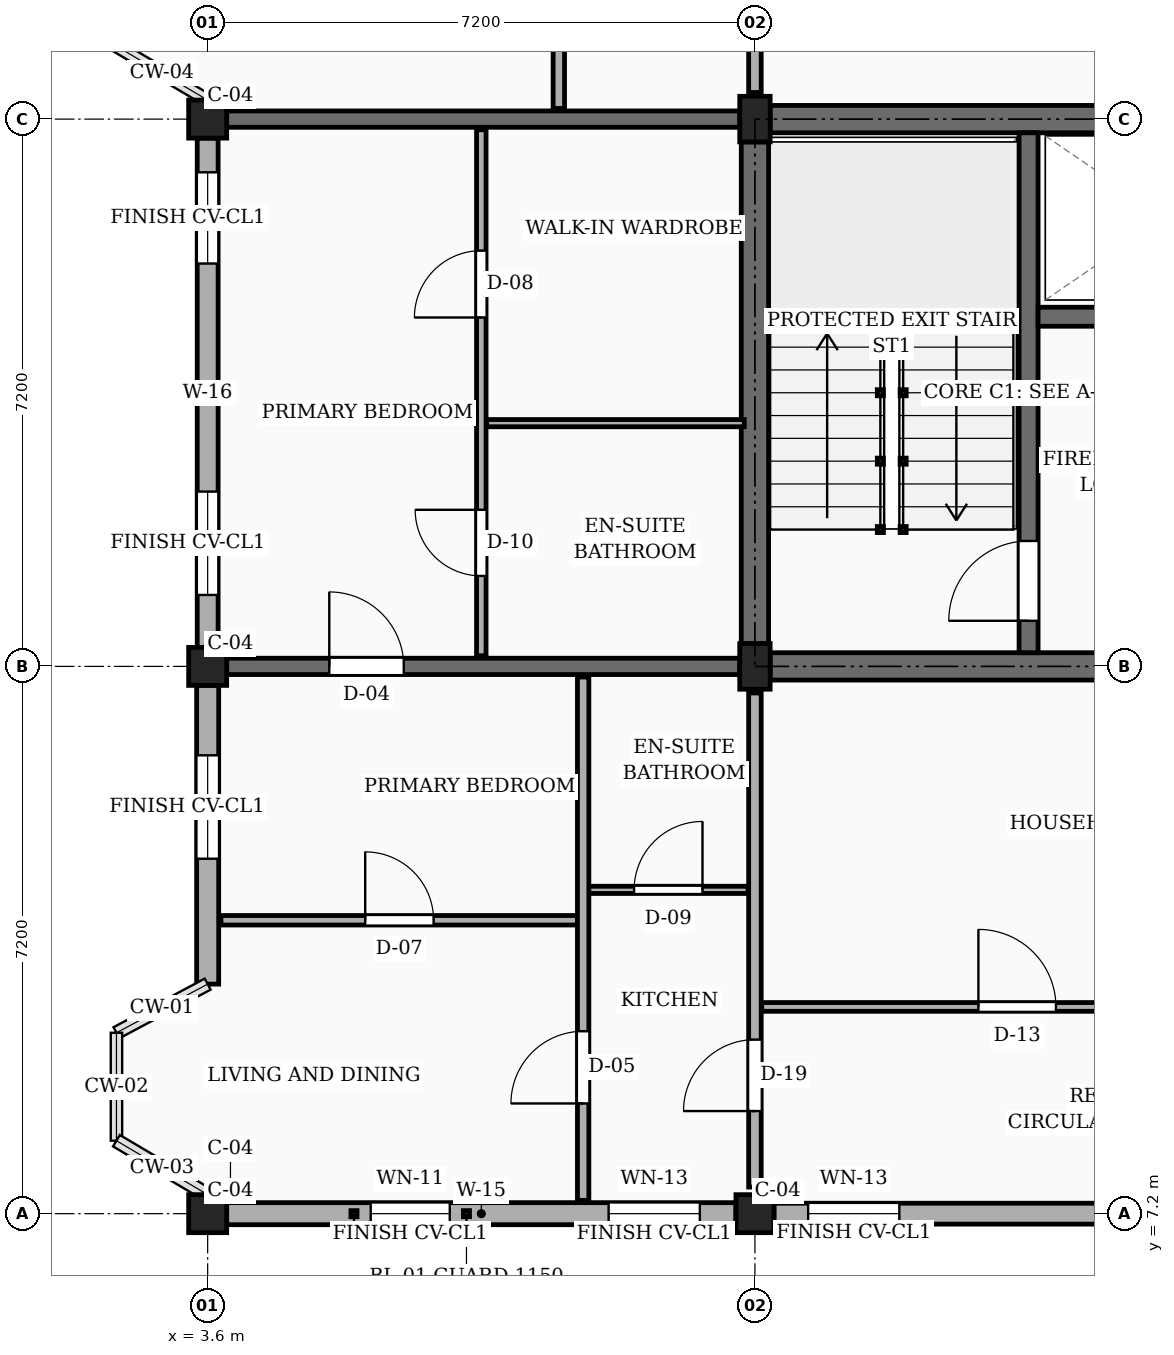
"""IFC4 building model, lengths in metres.
Left out: names, types, materials, properties, quantities, classifications, styles, units other than length and angle.
Written with IfcOpenShell. Run it as: python <this file> out.ifc"""

import sys

from ifc_helpers import new_model, si_unit, direction, frame, frame_2d, origin, origin_2d, place, context, subcontext, project, spatial, rectangle, extrude, element, fill, save


model = new_model("IFC4")
c1 = context("Model", 3, precision=1e-05, world=origin(), true_north=direction((0.0, 1.0)))
c2 = subcontext(c1, "Body", "Model", "MODEL_VIEW")
j1 = project(units=[si_unit("LENGTHUNIT", "METRE"), si_unit("PLANEANGLEUNIT", "RADIAN")], contexts=[c1])
p1 = place(None, origin())
s1 = spatial("IfcSite", under=j1, at=p1, CompositionType="ELEMENT")
p2 = place(p1, origin())
s2 = spatial("IfcBuilding", under=s1, at=p2, CompositionType="ELEMENT")
p3 = place(p2, frame((0.0, 0.0, 32.85)))
s3 = spatial("IfcBuildingStorey", under=s2, at=p3, CompositionType="ELEMENT", Elevation=32.85)
for number, where, z_axis, x_axis in (
    (1, (3.6, 7.2, 0.0), (0.0, 0.0, 1.0), (1.0, 0.0, 0.0)),
    (2, (3.6, 14.4, 0.0), (0.0, 0.0, 1.0), (1.0, 0.0, 0.0)),
    (3, (3.6, 21.6, 0.0), (0.0, 0.0, 1.0), (1.0, 0.0, 0.0)),
    (4, (10.8, 7.2, 0.0), (0.0, 0.0, 1.0), (1.0, 0.0, 0.0)),
):
    element("IfcColumn", number, at=place(p3, frame(where, z_axis=z_axis, x_axis=x_axis)), inside=s3, PredefinedType="COLUMN", context=c2, shape_type="SweptSolid", body=[
        extrude(rectangle(XDim=0.5, YDim=0.5, at=origin_2d()), origin(), (0.0, 0.0, 1.0), 3.15),
    ])
for number, where, z_axis, x_axis in (
    (5, (10.8, 14.4, 0.0), (0.0, 0.0, 1.0), (1.0, 0.0, 0.0)),
    (6, (10.8, 21.6, 0.0), (0.0, 0.0, 1.0), (1.0, 0.0, 0.0)),
):
    element("IfcColumn", number, at=place(p3, frame(where, z_axis=z_axis, x_axis=x_axis)), inside=s3, PredefinedType="COLUMN", context=c2, shape_type="SweptSolid", body=[
        extrude(rectangle(XDim=0.4, YDim=0.6, at=origin_2d()), origin(), (0.0, 0.0, 1.0), 3.15),
    ])
p4 = place(p3, frame((3.85, 14.4, 0.0), z_axis=(0.0, 0.0, 1.0), x_axis=(1.0, 0.0, 0.0)))
e7 = element("IfcWall", 7, at=p4, inside=s3, PredefinedType="SOLIDWALL", context=c2, shape_type="SweptSolid", body=[
    extrude(rectangle(XDim=6.75, YDim=0.215, at=frame_2d((3.375, 0.0))), origin(), (0.0, 0.0, 1.0), 2.17),
])
p5 = place(p4, frame((1.35, 0.0, 0.0)))
e8 = element("IfcOpeningElement", 8, at=p5, cuts=e7, PredefinedType="OPENING", context=c2, shape_type="SweptSolid", body=[
    extrude(rectangle(XDim=0.98, YDim=2.12, at=frame_2d((0.49, 1.06))), frame((0.0, 0.118, 0.0), z_axis=(0.0, -1.0, 0.0), x_axis=(1.0, 0.0, 0.0)), (0.0, 0.0, 1.0), 0.235),
])
p6 = place(p3, frame((3.85, 21.6, 0.0), z_axis=(0.0, 0.0, 1.0), x_axis=(1.0, 0.0, 0.0)))
e9 = element("IfcWall", 9, at=p6, inside=s3, PredefinedType="SOLIDWALL", context=c2, shape_type="SweptSolid", body=[
    extrude(rectangle(XDim=6.75, YDim=0.215, at=frame_2d((3.375, 0.0))), origin(), (0.0, 0.0, 1.0), 2.17),
])
p7 = place(p3, frame((3.85, 7.2, 0.0), z_axis=(0.0, 0.0, 1.0), x_axis=(1.0, 0.0, 0.0)))
e10 = element("IfcWall", 10, at=p7, inside=s3, PredefinedType="SOLIDWALL", context=c2, shape_type="SweptSolid", body=[
    extrude(rectangle(XDim=6.7, YDim=0.29, at=frame_2d((3.35, 0.0))), origin(), (0.0, 0.0, 1.0), 2.44),
])
p8 = place(p7, frame((1.895, 0.0, 0.78)))
e11 = element("IfcOpeningElement", 11, at=p8, cuts=e10, PredefinedType="OPENING", context=c2, shape_type="SweptSolid", body=[
    extrude(rectangle(XDim=1.04, YDim=1.26, at=frame_2d((0.52, 0.63))), frame((0.0, 0.155, 0.0), z_axis=(0.0, -1.0, 0.0), x_axis=(1.0, 0.0, 0.0)), (0.0, 0.0, 1.0), 0.31),
])
p9 = place(p7, frame((5.025, 0.0, 0.78)))
e12 = element("IfcOpeningElement", 12, at=p9, cuts=e10, PredefinedType="OPENING", context=c2, shape_type="SweptSolid", body=[
    extrude(rectangle(XDim=1.2, YDim=1.26, at=frame_2d((0.6, 0.63))), frame((0.0, 0.155, 0.0), z_axis=(0.0, -1.0, 0.0), x_axis=(1.0, 0.0, 0.0)), (0.0, 0.0, 1.0), 0.31),
])
p10 = place(p3, frame((11.05, 7.2, 0.0), z_axis=(0.0, 0.0, 1.0), x_axis=(1.0, 0.0, 0.0)))
e13 = element("IfcWall", 13, at=p10, inside=s3, PredefinedType="SOLIDWALL", context=c2, shape_type="SweptSolid", body=[
    extrude(rectangle(XDim=6.7, YDim=0.275, at=frame_2d((3.35, 0.0))), origin(), (0.0, 0.0, 1.0), 2.44),
])
p11 = place(p10, frame((0.45, 0.0, 0.78)))
e14 = element("IfcOpeningElement", 14, at=p11, cuts=e13, PredefinedType="OPENING", context=c2, shape_type="SweptSolid", body=[
    extrude(rectangle(XDim=1.2, YDim=1.26, at=frame_2d((0.6, 0.63))), frame((0.0, 0.147, 0.0), z_axis=(0.0, -1.0, 0.0), x_axis=(1.0, 0.0, 0.0)), (0.0, 0.0, 1.0), 0.295),
])
p12 = place(p10, frame((4.65, 0.0, 0.78)))
e15 = element("IfcOpeningElement", 15, at=p12, cuts=e13, PredefinedType="OPENING", context=c2, shape_type="SweptSolid", body=[
    extrude(rectangle(XDim=1.36, YDim=1.26, at=frame_2d((0.68, 0.63))), frame((0.0, 0.147, 0.0), z_axis=(0.0, -1.0, 0.0), x_axis=(1.0, 0.0, 0.0)), (0.0, 0.0, 1.0), 0.295),
])
p13 = place(p3, frame((3.6, 21.35, 0.0), z_axis=(0.0, 0.0, 1.0), x_axis=(0.0, -1.0, 0.0)))
e16 = element("IfcWall", 16, at=p13, inside=s3, PredefinedType="SOLIDWALL", context=c2, shape_type="SweptSolid", body=[
    extrude(rectangle(XDim=6.7, YDim=0.275, at=frame_2d((3.35, 0.0))), origin(), (0.0, 0.0, 1.0), 2.44),
])
p14 = place(p13, frame((0.45, 0.0, 0.78)))
e17 = element("IfcOpeningElement", 17, at=p14, cuts=e16, PredefinedType="OPENING", context=c2, shape_type="SweptSolid", body=[
    extrude(rectangle(XDim=1.2, YDim=1.26, at=frame_2d((0.6, 0.63))), frame((0.0, 0.147, 0.0), z_axis=(0.0, -1.0, 0.0), x_axis=(1.0, 0.0, 0.0)), (0.0, 0.0, 1.0), 0.295),
])
p15 = place(p13, frame((4.65, 0.0, 0.78)))
e18 = element("IfcOpeningElement", 18, at=p15, cuts=e16, PredefinedType="OPENING", context=c2, shape_type="SweptSolid", body=[
    extrude(rectangle(XDim=1.36, YDim=1.26, at=frame_2d((0.68, 0.63))), frame((0.0, 0.147, 0.0), z_axis=(0.0, -1.0, 0.0), x_axis=(1.0, 0.0, 0.0)), (0.0, 0.0, 1.0), 0.295),
])
p16 = place(p3, frame((3.6, 14.15, 0.0), z_axis=(0.0, 0.0, 1.0), x_axis=(0.0, -1.0, 0.0)))
e19 = element("IfcWall", 19, at=p16, inside=s3, PredefinedType="SOLIDWALL", context=c2, shape_type="SweptSolid", body=[
    extrude(rectangle(XDim=3.93, YDim=0.29, at=frame_2d((1.965, 0.0))), origin(), (0.0, 0.0, 1.0), 2.44),
])
p17 = place(p16, frame((0.92, 0.0, 0.78)))
e20 = element("IfcOpeningElement", 20, at=p17, cuts=e19, PredefinedType="OPENING", context=c2, shape_type="SweptSolid", body=[
    extrude(rectangle(XDim=1.36, YDim=1.26, at=frame_2d((0.68, 0.63))), frame((0.0, 0.155, 0.0), z_axis=(0.0, -1.0, 0.0), x_axis=(1.0, 0.0, 0.0)), (0.0, 0.0, 1.0), 0.31),
])
p18 = place(p3, frame((10.8, 14.7, 0.0), z_axis=(0.0, 0.0, 1.0), x_axis=(0.0, 1.0, 0.0)))
e21 = element("IfcWall", 21, at=p18, inside=s3, PredefinedType="SHEAR", context=c2, shape_type="SweptSolid", body=[
    extrude(rectangle(XDim=6.6, YDim=0.36, at=frame_2d((3.3, 0.0))), origin(), (0.0, 0.0, 1.0), 2.87),
])
for number, where, z_axis, x_axis in (
    (22, (11.0, 21.6, 0.0), (0.0, 0.0, 1.0), (1.0, 0.0, 0.0)),
    (23, (11.0, 14.4, 0.0), (0.0, 0.0, 1.0), (1.0, 0.0, 0.0)),
):
    element("IfcWall", number, at=place(p3, frame(where, z_axis=z_axis, x_axis=x_axis)), inside=s3, PredefinedType="SHEAR", context=c2, shape_type="SweptSolid", body=[
        extrude(rectangle(XDim=6.8, YDim=0.36, at=frame_2d((3.4, 0.0))), origin(), (0.0, 0.0, 1.0), 2.87),
    ])
p19 = place(p3, frame((14.4, 14.58, 0.0), z_axis=(0.0, 0.0, 1.0), x_axis=(0.0, 1.0, 0.0)))
e24 = element("IfcWall", 24, at=p19, inside=s3, PredefinedType="SHEAR", context=c2, shape_type="SweptSolid", body=[
    extrude(rectangle(XDim=6.84, YDim=0.25, at=frame_2d((3.42, 0.0))), origin(), (0.0, 0.0, 1.0), 2.87),
])
p20 = place(p19, frame((0.42, 0.0, 0.0)))
e25 = element("IfcOpeningElement", 25, at=p20, cuts=e24, PredefinedType="OPENING", context=c2, shape_type="SweptSolid", body=[
    extrude(rectangle(XDim=1.05, YDim=2.15, at=frame_2d((0.525, 1.075))), frame((0.0, 0.135, 0.0), z_axis=(0.0, -1.0, 0.0), x_axis=(1.0, 0.0, 0.0)), (0.0, 0.0, 1.0), 0.27),
])
p21 = place(p3, frame((14.525, 19.0, 0.0), z_axis=(0.0, 0.0, 1.0), x_axis=(1.0, 0.0, 0.0)))
e26 = element("IfcWall", 26, at=p21, inside=s3, PredefinedType="SHEAR", context=c2, shape_type="SweptSolid", body=[
    extrude(rectangle(XDim=3.295, YDim=0.25, at=frame_2d((1.647, 0.0))), origin(), (0.0, 0.0, 1.0), 2.87),
])
p22 = place(p21, frame((1.1, 0.0, 0.0)))
e27 = element("IfcOpeningElement", 27, at=p22, cuts=e26, PredefinedType="OPENING", context=c2, shape_type="SweptSolid", body=[
    extrude(rectangle(XDim=1.1, YDim=2.2, at=frame_2d((0.55, 1.1))), frame((0.0, 0.135, 0.0), z_axis=(0.0, -1.0, 0.0), x_axis=(1.0, 0.0, 0.0)), (0.0, 0.0, 1.0), 0.27),
])
p23 = place(p3, frame((10.8, 7.55, 0.0), z_axis=(0.0, 0.0, 1.0), x_axis=(0.0, 1.0, 0.0)))
e28 = element("IfcWall", 28, at=p23, inside=s3, PredefinedType="PARTITIONING", context=c2, shape_type="SweptSolid", body=[
    extrude(rectangle(XDim=6.5, YDim=0.165, at=frame_2d((3.25, 0.0))), origin(), (0.0, 0.0, 1.0), 2.305),
])
p24 = place(p23, frame((1.0, 0.0, 0.0)))
e29 = element("IfcOpeningElement", 29, at=p24, cuts=e28, PredefinedType="OPENING", context=c2, shape_type="SweptSolid", body=[
    extrude(rectangle(XDim=0.94, YDim=2.12, at=frame_2d((0.47, 1.06))), frame((0.0, 0.093, 0.0), z_axis=(0.0, -1.0, 0.0), x_axis=(1.0, 0.0, 0.0)), (0.0, 0.0, 1.0), 0.185),
])
p25 = place(p3, frame((10.8, 21.95, 0.0), z_axis=(0.0, 0.0, 1.0), x_axis=(0.0, 1.0, 0.0)))
e30 = element("IfcWall", 30, at=p25, inside=s3, PredefinedType="PARTITIONING", context=c2, shape_type="SweptSolid", body=[
    extrude(rectangle(XDim=6.5, YDim=0.165, at=frame_2d((3.25, 0.0))), origin(), (0.0, 0.0, 1.0), 2.305),
])
p26 = place(p25, frame((1.0, 0.0, 0.0)))
e31 = element("IfcOpeningElement", 31, at=p26, cuts=e30, PredefinedType="OPENING", context=c2, shape_type="SweptSolid", body=[
    extrude(rectangle(XDim=1.14, YDim=2.18, at=frame_2d((0.57, 1.09))), frame((0.0, 0.093, 0.0), z_axis=(0.0, -1.0, 0.0), x_axis=(1.0, 0.0, 0.0)), (0.0, 0.0, 1.0), 0.185),
])
p27 = place(p3, frame((10.89, 9.92, 0.0), z_axis=(0.0, 0.0, 1.0), x_axis=(1.0, 0.0, 0.0)))
e32 = element("IfcWall", 32, at=p27, inside=s3, PredefinedType="PARTITIONING", context=c2, shape_type="SweptSolid", body=[
    extrude(rectangle(XDim=7.02, YDim=0.115, at=frame_2d((3.51, 0.0))), origin(), (0.0, 0.0, 1.0), 2.305),
])
p28 = place(p27, frame((2.85, 0.0, 0.0)))
e33 = element("IfcOpeningElement", 33, at=p28, cuts=e32, PredefinedType="OPENING", context=c2, shape_type="SweptSolid", body=[
    extrude(rectangle(XDim=1.02, YDim=2.15, at=frame_2d((0.51, 1.075))), frame((0.0, 0.067, 0.0), z_axis=(0.0, -1.0, 0.0), x_axis=(1.0, 0.0, 0.0)), (0.0, 0.0, 1.0), 0.135),
])
p29 = place(p3, frame((3.775, 11.06, 0.0), z_axis=(0.0, 0.0, 1.0), x_axis=(1.0, 0.0, 0.0)))
e34 = element("IfcWall", 34, at=p29, inside=s3, PredefinedType="PARTITIONING", context=c2, shape_type="SweptSolid", body=[
    extrude(rectangle(XDim=4.695, YDim=0.125, at=frame_2d((2.348, 0.0))), origin(), (0.0, 0.0, 1.0), 2.305),
])
p30 = place(p29, frame((1.897, 0.0, 0.0)))
e35 = element("IfcOpeningElement", 35, at=p30, cuts=e34, PredefinedType="OPENING", context=c2, shape_type="SweptSolid", body=[
    extrude(rectangle(XDim=0.9, YDim=2.1, at=frame_2d((0.45, 1.05))), frame((0.0, 0.073, 0.0), z_axis=(0.0, -1.0, 0.0), x_axis=(1.0, 0.0, 0.0)), (0.0, 0.0, 1.0), 0.145),
])
p31 = place(p3, frame((8.61, 11.46, 0.0), z_axis=(0.0, 0.0, 1.0), x_axis=(1.0, 0.0, 0.0)))
e36 = element("IfcWall", 36, at=p31, inside=s3, PredefinedType="PARTITIONING", context=c2, shape_type="SweptSolid", body=[
    extrude(rectangle(XDim=2.1, YDim=0.095, at=frame_2d((1.05, 0.0))), origin(), (0.0, 0.0, 1.0), 2.305),
])
p32 = place(p31, frame((0.6, 0.0, 0.0)))
e37 = element("IfcOpeningElement", 37, at=p32, cuts=e36, PredefinedType="OPENING", context=c2, shape_type="SweptSolid", body=[
    extrude(rectangle(XDim=0.9, YDim=2.05, at=frame_2d((0.45, 1.025))), frame((0.0, 0.058, 0.0), z_axis=(0.0, -1.0, 0.0), x_axis=(1.0, 0.0, 0.0)), (0.0, 0.0, 1.0), 0.115),
])
p33 = place(p3, frame((8.54, 7.375, 0.0), z_axis=(0.0, 0.0, 1.0), x_axis=(0.0, 1.0, 0.0)))
e38 = element("IfcWall", 38, at=p33, inside=s3, PredefinedType="PARTITIONING", context=c2, shape_type="SweptSolid", body=[
    extrude(rectangle(XDim=6.885, YDim=0.15, at=frame_2d((3.442, 0.0))), origin(), (0.0, 0.0, 1.0), 2.305),
])
p34 = place(p33, frame((1.275, 0.0, 0.0)))
e39 = element("IfcOpeningElement", 39, at=p34, cuts=e38, PredefinedType="OPENING", context=c2, shape_type="SweptSolid", body=[
    extrude(rectangle(XDim=0.95, YDim=2.1, at=frame_2d((0.475, 1.05))), frame((0.0, 0.085, 0.0), z_axis=(0.0, -1.0, 0.0), x_axis=(1.0, 0.0, 0.0)), (0.0, 0.0, 1.0), 0.17),
])
p35 = place(p3, frame((7.2, 14.54, 0.0), z_axis=(0.0, 0.0, 1.0), x_axis=(0.0, 1.0, 0.0)))
e40 = element("IfcWall", 40, at=p35, inside=s3, PredefinedType="PARTITIONING", context=c2, shape_type="SweptSolid", body=[
    extrude(rectangle(XDim=6.92, YDim=0.125, at=frame_2d((3.46, 0.0))), origin(), (0.0, 0.0, 1.0), 2.305),
])
p36 = place(p35, frame((1.05, 0.0, 0.0)))
e41 = element("IfcOpeningElement", 41, at=p36, cuts=e40, PredefinedType="OPENING", context=c2, shape_type="SweptSolid", body=[
    extrude(rectangle(XDim=0.87, YDim=2.05, at=frame_2d((0.435, 1.025))), frame((0.0, 0.073, 0.0), z_axis=(0.0, -1.0, 0.0), x_axis=(1.0, 0.0, 0.0)), (0.0, 0.0, 1.0), 0.145),
])
p37 = place(p35, frame((4.45, 0.0, 0.0)))
e42 = element("IfcOpeningElement", 42, at=p37, cuts=e40, PredefinedType="OPENING", context=c2, shape_type="SweptSolid", body=[
    extrude(rectangle(XDim=0.88, YDim=2.08, at=frame_2d((0.44, 1.04))), frame((0.0, 0.073, 0.0), z_axis=(0.0, -1.0, 0.0), x_axis=(1.0, 0.0, 0.0)), (0.0, 0.0, 1.0), 0.145),
])
p38 = place(p3, frame((7.27, 17.6, 0.0), z_axis=(0.0, 0.0, 1.0), x_axis=(1.0, 0.0, 0.0)))
e43 = element("IfcWall", 43, at=p38, inside=s3, PredefinedType="PARTITIONING", context=c2, shape_type="SweptSolid", body=[
    extrude(rectangle(XDim=3.39, YDim=0.095, at=frame_2d((1.695, 0.0))), origin(), (0.0, 0.0, 1.0), 2.305),
])
p39 = place(p3, frame((8.22, 21.74, 0.0), z_axis=(0.0, 0.0, 1.0), x_axis=(0.0, 1.0, 0.0)))
e44 = element("IfcWall", 44, at=p39, inside=s3, PredefinedType="PARTITIONING", context=c2, shape_type="SweptSolid", body=[
    extrude(rectangle(XDim=6.92, YDim=0.15, at=frame_2d((3.46, 0.0))), origin(), (0.0, 0.0, 1.0), 2.305),
])
p40 = place(p39, frame((1.31, 0.0, 0.0)))
e45 = element("IfcOpeningElement", 45, at=p40, cuts=e44, PredefinedType="OPENING", context=c2, shape_type="SweptSolid", body=[
    extrude(rectangle(XDim=0.95, YDim=2.1, at=frame_2d((0.475, 1.05))), frame((0.0, 0.085, 0.0), z_axis=(0.0, -1.0, 0.0), x_axis=(1.0, 0.0, 0.0)), (0.0, 0.0, 1.0), 0.17),
])
p41 = place(p8, origin())
e46 = element("IfcWindow", 46, at=p41, inside=s3, PartitioningType="SINGLE_PANEL", PredefinedType="WINDOW", context=c2, shape_type="SweptSolid", body=[
    extrude(rectangle(XDim=1.04, YDim=1.26, at=frame_2d((0.52, 0.63))), frame((0.0, 0.03, 0.0), z_axis=(0.0, -1.0, 0.0), x_axis=(1.0, 0.0, 0.0)), (0.0, 0.0, 1.0), 0.06),
])
fill(e11, e46)
p42 = place(p9, origin())
e47 = element("IfcWindow", 47, at=p42, inside=s3, PartitioningType="SINGLE_PANEL", PredefinedType="WINDOW", context=c2, shape_type="SweptSolid", body=[
    extrude(rectangle(XDim=1.2, YDim=1.26, at=frame_2d((0.6, 0.63))), frame((0.0, 0.03, 0.0), z_axis=(0.0, -1.0, 0.0), x_axis=(1.0, 0.0, 0.0)), (0.0, 0.0, 1.0), 0.06),
])
fill(e12, e47)
p43 = place(p11, origin())
e48 = element("IfcWindow", 48, at=p43, inside=s3, PartitioningType="SINGLE_PANEL", PredefinedType="WINDOW", context=c2, shape_type="SweptSolid", body=[
    extrude(rectangle(XDim=1.2, YDim=1.26, at=frame_2d((0.6, 0.63))), frame((0.0, 0.03, 0.0), z_axis=(0.0, -1.0, 0.0), x_axis=(1.0, 0.0, 0.0)), (0.0, 0.0, 1.0), 0.06),
])
fill(e14, e48)
p44 = place(p14, origin())
e49 = element("IfcWindow", 49, at=p44, inside=s3, PartitioningType="SINGLE_PANEL", PredefinedType="WINDOW", context=c2, shape_type="SweptSolid", body=[
    extrude(rectangle(XDim=1.2, YDim=1.26, at=frame_2d((0.6, 0.63))), frame((0.0, 0.03, 0.0), z_axis=(0.0, -1.0, 0.0), x_axis=(1.0, 0.0, 0.0)), (0.0, 0.0, 1.0), 0.06),
])
fill(e17, e49)
p45 = place(p15, origin())
e50 = element("IfcWindow", 50, at=p45, inside=s3, PartitioningType="SINGLE_PANEL", PredefinedType="WINDOW", context=c2, shape_type="SweptSolid", body=[
    extrude(rectangle(XDim=1.36, YDim=1.26, at=frame_2d((0.68, 0.63))), frame((0.0, 0.03, 0.0), z_axis=(0.0, -1.0, 0.0), x_axis=(1.0, 0.0, 0.0)), (0.0, 0.0, 1.0), 0.06),
])
fill(e18, e50)
p46 = place(p17, origin())
e51 = element("IfcWindow", 51, at=p46, inside=s3, PartitioningType="SINGLE_PANEL", PredefinedType="WINDOW", context=c2, shape_type="SweptSolid", body=[
    extrude(rectangle(XDim=1.36, YDim=1.26, at=frame_2d((0.68, 0.63))), frame((0.0, 0.03, 0.0), z_axis=(0.0, -1.0, 0.0), x_axis=(1.0, 0.0, 0.0)), (0.0, 0.0, 1.0), 0.06),
])
fill(e20, e51)
p47 = place(p20, origin())
e52 = element("IfcDoor", 52, at=p47, inside=s3, OperationType="SINGLE_SWING_LEFT", PredefinedType="DOOR", context=c2, shape_type="SweptSolid", body=[
    extrude(rectangle(XDim=1.05, YDim=2.15, at=frame_2d((0.525, 1.075))), frame((0.0, 0.025, 0.0), z_axis=(0.0, -1.0, 0.0), x_axis=(1.0, 0.0, 0.0)), (0.0, 0.0, 1.0), 0.05),
])
fill(e25, e52)
p48 = place(p24, origin())
e53 = element("IfcDoor", 53, at=p48, inside=s3, OperationType="SINGLE_SWING_LEFT", PredefinedType="DOOR", context=c2, shape_type="SweptSolid", body=[
    extrude(rectangle(XDim=0.94, YDim=2.12, at=frame_2d((0.47, 1.06))), frame((0.0, 0.025, 0.0), z_axis=(0.0, -1.0, 0.0), x_axis=(1.0, 0.0, 0.0)), (0.0, 0.0, 1.0), 0.05),
])
fill(e29, e53)
p49 = place(p28, origin())
e54 = element("IfcDoor", 54, at=p49, inside=s3, OperationType="SINGLE_SWING_LEFT", PredefinedType="DOOR", context=c2, shape_type="SweptSolid", body=[
    extrude(rectangle(XDim=1.02, YDim=2.15, at=frame_2d((0.51, 1.075))), frame((0.0, 0.025, 0.0), z_axis=(0.0, -1.0, 0.0), x_axis=(1.0, 0.0, 0.0)), (0.0, 0.0, 1.0), 0.05),
])
fill(e33, e54)
p50 = place(p30, origin())
e55 = element("IfcDoor", 55, at=p50, inside=s3, OperationType="SINGLE_SWING_LEFT", PredefinedType="DOOR", context=c2, shape_type="SweptSolid", body=[
    extrude(rectangle(XDim=0.9, YDim=2.1, at=frame_2d((0.45, 1.05))), frame((0.0, 0.025, 0.0), z_axis=(0.0, -1.0, 0.0), x_axis=(1.0, 0.0, 0.0)), (0.0, 0.0, 1.0), 0.05),
])
fill(e35, e55)
p51 = place(p32, origin())
e56 = element("IfcDoor", 56, at=p51, inside=s3, OperationType="SINGLE_SWING_RIGHT", PredefinedType="DOOR", context=c2, shape_type="SweptSolid", body=[
    extrude(rectangle(XDim=0.9, YDim=2.05, at=frame_2d((0.45, 1.025))), frame((0.0, 0.025, 0.0), z_axis=(0.0, -1.0, 0.0), x_axis=(1.0, 0.0, 0.0)), (0.0, 0.0, 1.0), 0.05),
])
fill(e37, e56)
p52 = place(p34, origin())
e57 = element("IfcDoor", 57, at=p52, inside=s3, OperationType="SINGLE_SWING_LEFT", PredefinedType="DOOR", context=c2, shape_type="SweptSolid", body=[
    extrude(rectangle(XDim=0.95, YDim=2.1, at=frame_2d((0.475, 1.05))), frame((0.0, 0.025, 0.0), z_axis=(0.0, -1.0, 0.0), x_axis=(1.0, 0.0, 0.0)), (0.0, 0.0, 1.0), 0.05),
])
fill(e39, e57)
p53 = place(p36, origin())
e58 = element("IfcDoor", 58, at=p53, inside=s3, OperationType="SINGLE_SWING_RIGHT", PredefinedType="DOOR", context=c2, shape_type="SweptSolid", body=[
    extrude(rectangle(XDim=0.87, YDim=2.05, at=frame_2d((0.435, 1.025))), frame((0.0, 0.025, 0.0), z_axis=(0.0, -1.0, 0.0), x_axis=(1.0, 0.0, 0.0)), (0.0, 0.0, 1.0), 0.05),
])
fill(e41, e58)
p54 = place(p37, origin())
e59 = element("IfcDoor", 59, at=p54, inside=s3, OperationType="SINGLE_SWING_LEFT", PredefinedType="DOOR", context=c2, shape_type="SweptSolid", body=[
    extrude(rectangle(XDim=0.88, YDim=2.08, at=frame_2d((0.44, 1.04))), frame((0.0, 0.025, 0.0), z_axis=(0.0, -1.0, 0.0), x_axis=(1.0, 0.0, 0.0)), (0.0, 0.0, 1.0), 0.05),
])
fill(e42, e59)
p55 = place(p5, origin())
e60 = element("IfcDoor", 60, at=p55, inside=s3, OperationType="SINGLE_SWING_LEFT", PredefinedType="DOOR", context=c2, shape_type="SweptSolid", body=[
    extrude(rectangle(XDim=0.98, YDim=2.12, at=frame_2d((0.49, 1.06))), frame((0.0, 0.025, 0.0), z_axis=(0.0, -1.0, 0.0), x_axis=(1.0, 0.0, 0.0)), (0.0, 0.0, 1.0), 0.05),
])
fill(e8, e60)
save(model, sys.argv[1])
